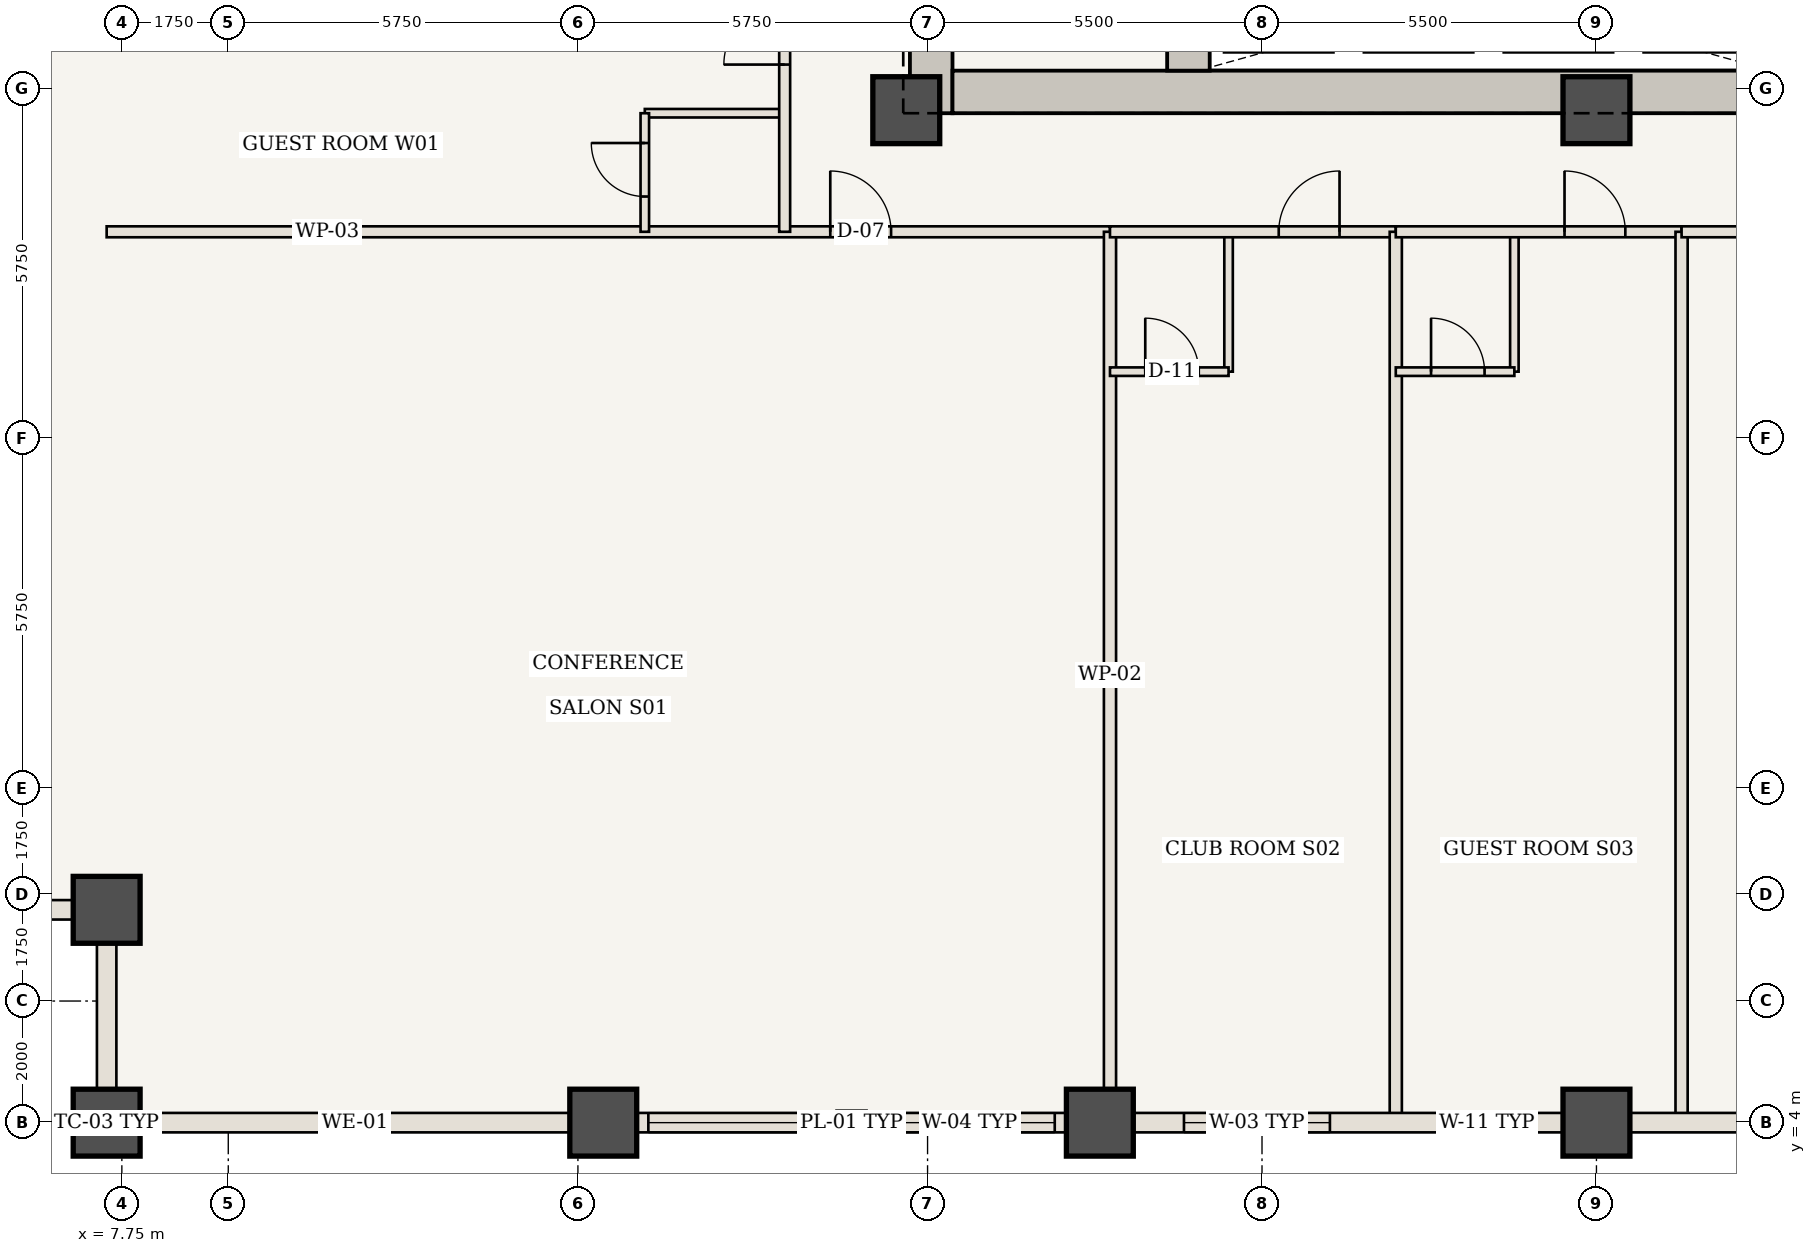
"""IFC4 building model, lengths in metres.
Left out: names, types, materials, properties, quantities, classifications, styles, units other than length and angle.
Written with IfcOpenShell. Run it as: python <this file> out.ifc"""

import sys

from ifc_helpers import new_model, si_unit, direction, frame, frame_2d, origin, origin_2d, place, context, subcontext, project, spatial, rectangle, extrude, element, fill, save


model = new_model("IFC4")
c1 = context("Model", 3, precision=1e-05, world=origin(), true_north=direction((0.0, 1.0)))
c2 = subcontext(c1, "Body", "Model", "MODEL_VIEW")
j1 = project(units=[si_unit("LENGTHUNIT", "METRE"), si_unit("PLANEANGLEUNIT", "RADIAN")], contexts=[c1])
p1 = place(None, origin())
s1 = spatial("IfcSite", under=j1, at=p1, CompositionType="ELEMENT")
p2 = place(p1, origin())
s2 = spatial("IfcBuilding", under=s1, at=p2, CompositionType="ELEMENT")
p3 = place(p2, frame((0.0, 0.0, 59.85)))
s3 = spatial("IfcBuildingStorey", under=s2, at=p3, CompositionType="ELEMENT", Elevation=59.85)
p4 = place(p3, frame((21.06, 20.6, 0.0), z_axis=(0.0, 0.0, 1.0), x_axis=(0.0, 1.0, 0.0)))
e1 = element("IfcWall", 1, at=p4, inside=s3, PredefinedType="SHEAR", context=c2, shape_type="SweptSolid", body=[
    extrude(rectangle(XDim=10.0, YDim=0.7, at=frame_2d((5.0, 0.0))), origin(), (0.0, 0.0, 1.0), 3.5),
])
p5 = place(p4, frame((1.15, 0.0, 0.0)))
e2 = element("IfcOpeningElement", 2, at=p5, cuts=e1, PredefinedType="OPENING", context=c2, shape_type="SweptSolid", body=[
    extrude(rectangle(XDim=1.15, YDim=2.15, at=frame_2d((0.575, 1.075))), frame((0.0, 0.36, 0.0), z_axis=(0.0, -1.0, 0.0), x_axis=(1.0, 0.0, 0.0)), (0.0, 0.0, 1.0), 0.72),
])
p6 = place(p3, frame((21.41, 20.95, 0.0), z_axis=(0.0, 0.0, 1.0), x_axis=(1.0, 0.0, 0.0)))
e3 = element("IfcWall", 3, at=p6, inside=s3, PredefinedType="SHEAR", context=c2, shape_type="SweptSolid", body=[
    extrude(rectangle(XDim=13.74, YDim=0.7, at=frame_2d((6.87, 0.0))), origin(), (0.0, 0.0, 1.0), 3.5),
])
p7 = place(p3, frame((25.29, 21.3, 0.0), z_axis=(0.0, 0.0, 1.0), x_axis=(0.0, 1.0, 0.0)))
e4 = element("IfcWall", 4, at=p7, inside=s3, PredefinedType="SHEAR", context=c2, shape_type="SweptSolid", body=[
    extrude(rectangle(XDim=9.3, YDim=0.7, at=frame_2d((4.65, 0.0))), origin(), (0.0, 0.0, 1.0), 3.5),
])
for number, where, z_axis, x_axis in (
    (5, (20.65, 20.65, 0.0), (0.0, 0.0, 1.0), (1.0, 0.0, 0.0)),
    (6, (32.0, 20.65, 0.0), (0.0, 0.0, 1.0), (1.0, 0.0, 0.0)),
    (7, (7.5, 4.0, 0.0), (0.0, 0.0, 1.0), (1.0, 0.0, 0.0)),
    (8, (7.5, 7.5, 0.0), (0.0, 0.0, 1.0), (1.0, 0.0, 0.0)),
    (9, (15.667, 4.0, 0.0), (0.0, 0.0, 1.0), (1.0, 0.0, 0.0)),
    (10, (23.833, 4.0, 0.0), (0.0, 0.0, 1.0), (1.0, 0.0, 0.0)),
    (11, (32.0, 4.0, 0.0), (0.0, 0.0, 1.0), (1.0, 0.0, 0.0)),
):
    element("IfcColumn", number, at=place(p3, frame(where, z_axis=z_axis, x_axis=x_axis)), inside=s3, PredefinedType="COLUMN", context=c2, shape_type="SweptSolid", body=[
        extrude(rectangle(XDim=1.1, YDim=1.1, at=origin_2d()), origin(), (0.0, 0.0, 1.0), 3.5),
    ])
p8 = place(p3, frame((7.5, 18.65, 0.0), z_axis=(0.0, 0.0, 1.0), x_axis=(1.0, 0.0, 0.0)))
e12 = element("IfcWall", 12, at=p8, inside=s3, PredefinedType="STANDARD", context=c2, shape_type="SweptSolid", body=[
    extrude(rectangle(XDim=16.5, YDim=0.18, at=frame_2d((8.25, 0.0))), origin(), (0.0, 0.0, 1.0), 3.32),
])
p9 = place(p8, frame((11.9, 0.0, 0.0)))
e13 = element("IfcOpeningElement", 13, at=p9, cuts=e12, PredefinedType="OPENING", context=c2, shape_type="SweptSolid", body=[
    extrude(rectangle(XDim=1.0, YDim=2.15, at=frame_2d((0.5, 1.075))), frame((0.0, 0.1, 0.0), z_axis=(0.0, -1.0, 0.0), x_axis=(1.0, 0.0, 0.0)), (0.0, 0.0, 1.0), 0.2),
])
p10 = place(p3, frame((24.0, 4.06, 0.0), z_axis=(0.0, 0.0, 1.0), x_axis=(0.0, 1.0, 0.0)))
e14 = element("IfcWall", 14, at=p10, inside=s3, PredefinedType="STANDARD", context=c2, shape_type="SweptSolid", body=[
    extrude(rectangle(XDim=14.59, YDim=0.2, at=frame_2d((7.295, 0.0))), origin(), (0.0, 0.0, 1.0), 3.32),
])
p11 = place(p3, frame((25.95, 16.35, 0.0), z_axis=(0.0, 0.0, 1.0), x_axis=(0.0, 1.0, 0.0)))
e15 = element("IfcWall", 15, at=p11, inside=s3, PredefinedType="STANDARD", context=c2, shape_type="SweptSolid", body=[
    extrude(rectangle(XDim=2.3, YDim=0.14, at=frame_2d((1.15, 0.0))), origin(), (0.0, 0.0, 1.0), 3.32),
])
p12 = place(p3, frame((24.0, 16.35, 0.0), z_axis=(0.0, 0.0, 1.0), x_axis=(1.0, 0.0, 0.0)))
e16 = element("IfcWall", 16, at=p12, inside=s3, PredefinedType="STANDARD", context=c2, shape_type="SweptSolid", body=[
    extrude(rectangle(XDim=1.95, YDim=0.14, at=frame_2d((0.975, 0.0))), origin(), (0.0, 0.0, 1.0), 3.32),
])
p13 = place(p12, frame((0.58, 0.0, 0.0)))
e17 = element("IfcOpeningElement", 17, at=p13, cuts=e16, PredefinedType="OPENING", context=c2, shape_type="SweptSolid", body=[
    extrude(rectangle(XDim=0.88, YDim=2.1, at=frame_2d((0.44, 1.05))), frame((0.0, 0.08, 0.0), z_axis=(0.0, -1.0, 0.0), x_axis=(1.0, 0.0, 0.0)), (0.0, 0.0, 1.0), 0.16),
])
p14 = place(p3, frame((24.0, 18.65, 0.0), z_axis=(0.0, 0.0, 1.0), x_axis=(1.0, 0.0, 0.0)))
e18 = element("IfcWall", 18, at=p14, inside=s3, PredefinedType="STANDARD", context=c2, shape_type="SweptSolid", body=[
    extrude(rectangle(XDim=4.7, YDim=0.18, at=frame_2d((2.35, 0.0))), origin(), (0.0, 0.0, 1.0), 3.32),
])
p15 = place(p14, frame((2.775, 0.0, 0.0)))
e19 = element("IfcOpeningElement", 19, at=p15, cuts=e18, PredefinedType="OPENING", context=c2, shape_type="SweptSolid", body=[
    extrude(rectangle(XDim=1.0, YDim=2.15, at=frame_2d((0.5, 1.075))), frame((0.0, 0.1, 0.0), z_axis=(0.0, -1.0, 0.0), x_axis=(1.0, 0.0, 0.0)), (0.0, 0.0, 1.0), 0.2),
])
p16 = place(p3, frame((28.7, 4.06, 0.0), z_axis=(0.0, 0.0, 1.0), x_axis=(0.0, 1.0, 0.0)))
e20 = element("IfcWall", 20, at=p16, inside=s3, PredefinedType="STANDARD", context=c2, shape_type="SweptSolid", body=[
    extrude(rectangle(XDim=14.59, YDim=0.2, at=frame_2d((7.295, 0.0))), origin(), (0.0, 0.0, 1.0), 3.32),
])
p17 = place(p3, frame((30.65, 16.35, 0.0), z_axis=(0.0, 0.0, 1.0), x_axis=(0.0, 1.0, 0.0)))
e21 = element("IfcWall", 21, at=p17, inside=s3, PredefinedType="STANDARD", context=c2, shape_type="SweptSolid", body=[
    extrude(rectangle(XDim=2.3, YDim=0.14, at=frame_2d((1.15, 0.0))), origin(), (0.0, 0.0, 1.0), 3.32),
])
p18 = place(p3, frame((28.7, 16.35, 0.0), z_axis=(0.0, 0.0, 1.0), x_axis=(1.0, 0.0, 0.0)))
e22 = element("IfcWall", 22, at=p18, inside=s3, PredefinedType="STANDARD", context=c2, shape_type="SweptSolid", body=[
    extrude(rectangle(XDim=1.95, YDim=0.14, at=frame_2d((0.975, 0.0))), origin(), (0.0, 0.0, 1.0), 3.32),
])
p19 = place(p18, frame((0.58, 0.0, 0.0)))
e23 = element("IfcOpeningElement", 23, at=p19, cuts=e22, PredefinedType="OPENING", context=c2, shape_type="SweptSolid", body=[
    extrude(rectangle(XDim=0.88, YDim=2.1, at=frame_2d((0.44, 1.05))), frame((0.0, 0.08, 0.0), z_axis=(0.0, -1.0, 0.0), x_axis=(1.0, 0.0, 0.0)), (0.0, 0.0, 1.0), 0.16),
])
p20 = place(p3, frame((28.7, 18.65, 0.0), z_axis=(0.0, 0.0, 1.0), x_axis=(1.0, 0.0, 0.0)))
e24 = element("IfcWall", 24, at=p20, inside=s3, PredefinedType="STANDARD", context=c2, shape_type="SweptSolid", body=[
    extrude(rectangle(XDim=4.7, YDim=0.18, at=frame_2d((2.35, 0.0))), origin(), (0.0, 0.0, 1.0), 3.32),
])
p21 = place(p20, frame((2.775, 0.0, 0.0)))
e25 = element("IfcOpeningElement", 25, at=p21, cuts=e24, PredefinedType="OPENING", context=c2, shape_type="SweptSolid", body=[
    extrude(rectangle(XDim=1.0, YDim=2.15, at=frame_2d((0.5, 1.075))), frame((0.0, 0.1, 0.0), z_axis=(0.0, -1.0, 0.0), x_axis=(1.0, 0.0, 0.0)), (0.0, 0.0, 1.0), 0.2),
])
p22 = place(p3, frame((33.4, 4.06, 0.0), z_axis=(0.0, 0.0, 1.0), x_axis=(0.0, 1.0, 0.0)))
e26 = element("IfcWall", 26, at=p22, inside=s3, PredefinedType="STANDARD", context=c2, shape_type="SweptSolid", body=[
    extrude(rectangle(XDim=14.59, YDim=0.2, at=frame_2d((7.295, 0.0))), origin(), (0.0, 0.0, 1.0), 3.32),
])
p23 = place(p3, frame((33.4, 18.65, 0.0), z_axis=(0.0, 0.0, 1.0), x_axis=(1.0, 0.0, 0.0)))
e27 = element("IfcWall", 27, at=p23, inside=s3, PredefinedType="STANDARD", context=c2, shape_type="SweptSolid", body=[
    extrude(rectangle(XDim=23.1, YDim=0.18, at=frame_2d((11.55, 0.0))), origin(), (0.0, 0.0, 1.0), 3.32),
])
p24 = place(p23, frame((5.45, 0.0, 0.0)))
e28 = element("IfcOpeningElement", 28, at=p24, cuts=e27, PredefinedType="OPENING", context=c2, shape_type="SweptSolid", body=[
    extrude(rectangle(XDim=1.0, YDim=2.15, at=frame_2d((0.5, 1.075))), frame((0.0, 0.1, 0.0), z_axis=(0.0, -1.0, 0.0), x_axis=(1.0, 0.0, 0.0)), (0.0, 0.0, 1.0), 0.2),
])
p25 = place(p3, frame((16.35, 20.6, 0.0), z_axis=(0.0, 0.0, 1.0), x_axis=(1.0, 0.0, 0.0)))
e29 = element("IfcWall", 29, at=p25, inside=s3, PredefinedType="STANDARD", context=c2, shape_type="SweptSolid", body=[
    extrude(rectangle(XDim=2.3, YDim=0.14, at=frame_2d((1.15, 0.0))), origin(), (0.0, 0.0, 1.0), 2.615),
])
p26 = place(p3, frame((16.35, 18.65, 0.0), z_axis=(0.0, 0.0, 1.0), x_axis=(0.0, 1.0, 0.0)))
e30 = element("IfcWall", 30, at=p26, inside=s3, PredefinedType="STANDARD", context=c2, shape_type="SweptSolid", body=[
    extrude(rectangle(XDim=1.95, YDim=0.14, at=frame_2d((0.975, 0.0))), origin(), (0.0, 0.0, 1.0), 3.32),
])
p27 = place(p26, frame((0.58, 0.0, 0.0)))
e31 = element("IfcOpeningElement", 31, at=p27, cuts=e30, PredefinedType="OPENING", context=c2, shape_type="SweptSolid", body=[
    extrude(rectangle(XDim=0.88, YDim=2.1, at=frame_2d((0.44, 1.05))), frame((0.0, 0.08, 0.0), z_axis=(0.0, -1.0, 0.0), x_axis=(1.0, 0.0, 0.0)), (0.0, 0.0, 1.0), 0.16),
])
p28 = place(p3, frame((18.65, 18.65, 0.0), z_axis=(0.0, 0.0, 1.0), x_axis=(0.0, 1.0, 0.0)))
e32 = element("IfcWall", 32, at=p28, inside=s3, PredefinedType="STANDARD", context=c2, shape_type="SweptSolid", body=[
    extrude(rectangle(XDim=4.65, YDim=0.18, at=frame_2d((2.325, 0.0))), origin(), (0.0, 0.0, 1.0), 3.32),
])
p29 = place(p28, frame((2.75, 0.0, 0.0)))
e33 = element("IfcOpeningElement", 33, at=p29, cuts=e32, PredefinedType="OPENING", context=c2, shape_type="SweptSolid", body=[
    extrude(rectangle(XDim=1.0, YDim=2.15, at=frame_2d((0.5, 1.075))), frame((0.0, 0.1, 0.0), z_axis=(0.0, -1.0, 0.0), x_axis=(1.0, 0.0, 0.0)), (0.0, 0.0, 1.0), 0.2),
])
p30 = place(p3, frame((15.667, 4.0, 0.0), z_axis=(0.0, 0.0, 1.0), x_axis=(-1.0, 0.0, 0.0)))
e34 = element("IfcWall", 34, at=p30, inside=s3, PredefinedType="USERDEFINED", context=c2, shape_type="SweptSolid", body=[
    extrude(rectangle(XDim=8.167, YDim=0.32, at=frame_2d((4.083, 0.0))), origin(), (0.0, 0.0, 1.0), 2.52),
])
p31 = place(p3, frame((23.833, 4.0, 0.0), z_axis=(0.0, 0.0, 1.0), x_axis=(-1.0, 0.0, 0.0)))
e35 = element("IfcWall", 35, at=p31, inside=s3, PredefinedType="USERDEFINED", context=c2, shape_type="SweptSolid", body=[
    extrude(rectangle(XDim=8.167, YDim=0.32, at=frame_2d((4.083, 0.0))), origin(), (0.0, 0.0, 1.0), 2.52),
])
p32 = place(p31, frame((0.742, 0.0, 0.85)))
e36 = element("IfcOpeningElement", 36, at=p32, cuts=e35, PredefinedType="OPENING", context=c2, shape_type="SweptSolid", body=[
    extrude(rectangle(XDim=2.8, YDim=1.47, at=frame_2d((1.4, 0.735))), frame((0.0, 0.17, 0.0), z_axis=(0.0, -1.0, 0.0), x_axis=(1.0, 0.0, 0.0)), (0.0, 0.0, 1.0), 0.34),
])
p33 = place(p31, frame((4.625, 0.0, 0.85)))
e37 = element("IfcOpeningElement", 37, at=p33, cuts=e35, PredefinedType="OPENING", context=c2, shape_type="SweptSolid", body=[
    extrude(rectangle(XDim=2.8, YDim=1.47, at=frame_2d((1.4, 0.735))), frame((0.0, 0.17, 0.0), z_axis=(0.0, -1.0, 0.0), x_axis=(1.0, 0.0, 0.0)), (0.0, 0.0, 1.0), 0.34),
])
p34 = place(p3, frame((32.0, 4.0, 0.0), z_axis=(0.0, 0.0, 1.0), x_axis=(-1.0, 0.0, 0.0)))
e38 = element("IfcWall", 38, at=p34, inside=s3, PredefinedType="USERDEFINED", context=c2, shape_type="SweptSolid", body=[
    extrude(rectangle(XDim=8.167, YDim=0.32, at=frame_2d((4.083, 0.0))), origin(), (0.0, 0.0, 1.0), 2.52),
])
p35 = place(p34, frame((1.0, 0.0, 0.85)))
e39 = element("IfcOpeningElement", 39, at=p35, cuts=e38, PredefinedType="OPENING", context=c2, shape_type="SweptSolid", body=[
    extrude(rectangle(XDim=1.6, YDim=1.47, at=frame_2d((0.8, 0.735))), frame((0.0, 0.17, 0.0), z_axis=(0.0, -1.0, 0.0), x_axis=(1.0, 0.0, 0.0)), (0.0, 0.0, 1.0), 0.34),
])
p36 = place(p34, frame((4.383, 0.0, 0.85)))
e40 = element("IfcOpeningElement", 40, at=p36, cuts=e38, PredefinedType="OPENING", context=c2, shape_type="SweptSolid", body=[
    extrude(rectangle(XDim=2.4, YDim=1.47, at=frame_2d((1.2, 0.735))), frame((0.0, 0.17, 0.0), z_axis=(0.0, -1.0, 0.0), x_axis=(1.0, 0.0, 0.0)), (0.0, 0.0, 1.0), 0.34),
])
p37 = place(p3, frame((40.167, 4.0, 0.0), z_axis=(0.0, 0.0, 1.0), x_axis=(-1.0, 0.0, 0.0)))
e41 = element("IfcWall", 41, at=p37, inside=s3, PredefinedType="USERDEFINED", context=c2, shape_type="SweptSolid", body=[
    extrude(rectangle(XDim=8.167, YDim=0.32, at=frame_2d((4.083, 0.0))), origin(), (0.0, 0.0, 1.0), 2.52),
])
p38 = place(p37, frame((2.333, 0.0, 0.85)))
e42 = element("IfcOpeningElement", 42, at=p38, cuts=e41, PredefinedType="OPENING", context=c2, shape_type="SweptSolid", body=[
    extrude(rectangle(XDim=2.4, YDim=1.47, at=frame_2d((1.2, 0.735))), frame((0.0, 0.17, 0.0), z_axis=(0.0, -1.0, 0.0), x_axis=(1.0, 0.0, 0.0)), (0.0, 0.0, 1.0), 0.34),
])
for number, where, z_axis, x_axis in (
    (43, (7.5, 4.0, 0.0), (0.0, 0.0, 1.0), (0.0, 1.0, 0.0)),
    (44, (7.5, 7.5, 0.0), (0.0, 0.0, 1.0), (-1.0, 0.0, 0.0)),
):
    element("IfcWall", number, at=place(p3, frame(where, z_axis=z_axis, x_axis=x_axis)), inside=s3, PredefinedType="USERDEFINED", context=c2, shape_type="SweptSolid", body=[
        extrude(rectangle(XDim=3.5, YDim=0.32, at=frame_2d((1.75, 0.0))), origin(), (0.0, 0.0, 1.0), 2.52),
    ])
p39 = place(p9, origin())
e45 = element("IfcDoor", 45, at=p39, inside=s3, OperationType="SINGLE_SWING_LEFT", PredefinedType="DOOR", context=c2, shape_type="SweptSolid", body=[
    extrude(rectangle(XDim=1.0, YDim=2.15, at=frame_2d((0.5, 1.075))), frame((0.0, 0.025, 0.0), z_axis=(0.0, -1.0, 0.0), x_axis=(1.0, 0.0, 0.0)), (0.0, 0.0, 1.0), 0.05),
])
fill(e13, e45)
p40 = place(p13, origin())
e46 = element("IfcDoor", 46, at=p40, inside=s3, OperationType="SINGLE_SWING_LEFT", PredefinedType="DOOR", context=c2, shape_type="SweptSolid", body=[
    extrude(rectangle(XDim=0.88, YDim=2.1, at=frame_2d((0.44, 1.05))), frame((0.0, 0.025, 0.0), z_axis=(0.0, -1.0, 0.0), x_axis=(1.0, 0.0, 0.0)), (0.0, 0.0, 1.0), 0.05),
])
fill(e17, e46)
p41 = place(p15, origin())
e47 = element("IfcDoor", 47, at=p41, inside=s3, OperationType="SINGLE_SWING_RIGHT", PredefinedType="DOOR", context=c2, shape_type="SweptSolid", body=[
    extrude(rectangle(XDim=1.0, YDim=2.15, at=frame_2d((0.5, 1.075))), frame((0.0, 0.025, 0.0), z_axis=(0.0, -1.0, 0.0), x_axis=(1.0, 0.0, 0.0)), (0.0, 0.0, 1.0), 0.05),
])
fill(e19, e47)
p42 = place(p19, origin())
e48 = element("IfcDoor", 48, at=p42, inside=s3, OperationType="SINGLE_SWING_LEFT", PredefinedType="DOOR", context=c2, shape_type="SweptSolid", body=[
    extrude(rectangle(XDim=0.88, YDim=2.1, at=frame_2d((0.44, 1.05))), frame((0.0, 0.025, 0.0), z_axis=(0.0, -1.0, 0.0), x_axis=(1.0, 0.0, 0.0)), (0.0, 0.0, 1.0), 0.05),
])
fill(e23, e48)
p43 = place(p21, origin())
e49 = element("IfcDoor", 49, at=p43, inside=s3, OperationType="SINGLE_SWING_LEFT", PredefinedType="DOOR", context=c2, shape_type="SweptSolid", body=[
    extrude(rectangle(XDim=1.0, YDim=2.15, at=frame_2d((0.5, 1.075))), frame((0.0, 0.025, 0.0), z_axis=(0.0, -1.0, 0.0), x_axis=(1.0, 0.0, 0.0)), (0.0, 0.0, 1.0), 0.05),
])
fill(e25, e49)
p44 = place(p27, origin())
e50 = element("IfcDoor", 50, at=p44, inside=s3, OperationType="SINGLE_SWING_RIGHT", PredefinedType="DOOR", context=c2, shape_type="SweptSolid", body=[
    extrude(rectangle(XDim=0.88, YDim=2.1, at=frame_2d((0.44, 1.05))), frame((0.0, 0.025, 0.0), z_axis=(0.0, -1.0, 0.0), x_axis=(1.0, 0.0, 0.0)), (0.0, 0.0, 1.0), 0.05),
])
fill(e31, e50)
p45 = place(p29, origin())
e51 = element("IfcDoor", 51, at=p45, inside=s3, OperationType="SINGLE_SWING_LEFT", PredefinedType="DOOR", context=c2, shape_type="SweptSolid", body=[
    extrude(rectangle(XDim=1.0, YDim=2.15, at=frame_2d((0.5, 1.075))), frame((0.0, 0.025, 0.0), z_axis=(0.0, -1.0, 0.0), x_axis=(1.0, 0.0, 0.0)), (0.0, 0.0, 1.0), 0.05),
])
fill(e33, e51)
p46 = place(p32, origin())
e52 = element("IfcWindow", 52, at=p46, inside=s3, PartitioningType="SINGLE_PANEL", PredefinedType="WINDOW", context=c2, shape_type="SweptSolid", body=[
    extrude(rectangle(XDim=2.8, YDim=1.47, at=frame_2d((1.4, 0.735))), frame((0.0, 0.03, 0.0), z_axis=(0.0, -1.0, 0.0), x_axis=(1.0, 0.0, 0.0)), (0.0, 0.0, 1.0), 0.06),
])
fill(e36, e52)
p47 = place(p33, origin())
e53 = element("IfcWindow", 53, at=p47, inside=s3, PartitioningType="SINGLE_PANEL", PredefinedType="WINDOW", context=c2, shape_type="SweptSolid", body=[
    extrude(rectangle(XDim=2.8, YDim=1.47, at=frame_2d((1.4, 0.735))), frame((0.0, 0.03, 0.0), z_axis=(0.0, -1.0, 0.0), x_axis=(1.0, 0.0, 0.0)), (0.0, 0.0, 1.0), 0.06),
])
fill(e37, e53)
p48 = place(p35, origin())
e54 = element("IfcWindow", 54, at=p48, inside=s3, PartitioningType="SINGLE_PANEL", PredefinedType="WINDOW", context=c2, shape_type="SweptSolid", body=[
    extrude(rectangle(XDim=1.6, YDim=1.47, at=frame_2d((0.8, 0.735))), frame((0.0, 0.03, 0.0), z_axis=(0.0, -1.0, 0.0), x_axis=(1.0, 0.0, 0.0)), (0.0, 0.0, 1.0), 0.06),
])
fill(e39, e54)
p49 = place(p36, origin())
e55 = element("IfcWindow", 55, at=p49, inside=s3, PartitioningType="SINGLE_PANEL", PredefinedType="WINDOW", context=c2, shape_type="SweptSolid", body=[
    extrude(rectangle(XDim=2.4, YDim=1.47, at=frame_2d((1.2, 0.735))), frame((0.0, 0.03, 0.0), z_axis=(0.0, -1.0, 0.0), x_axis=(1.0, 0.0, 0.0)), (0.0, 0.0, 1.0), 0.06),
])
fill(e40, e55)
save(model, sys.argv[1])
